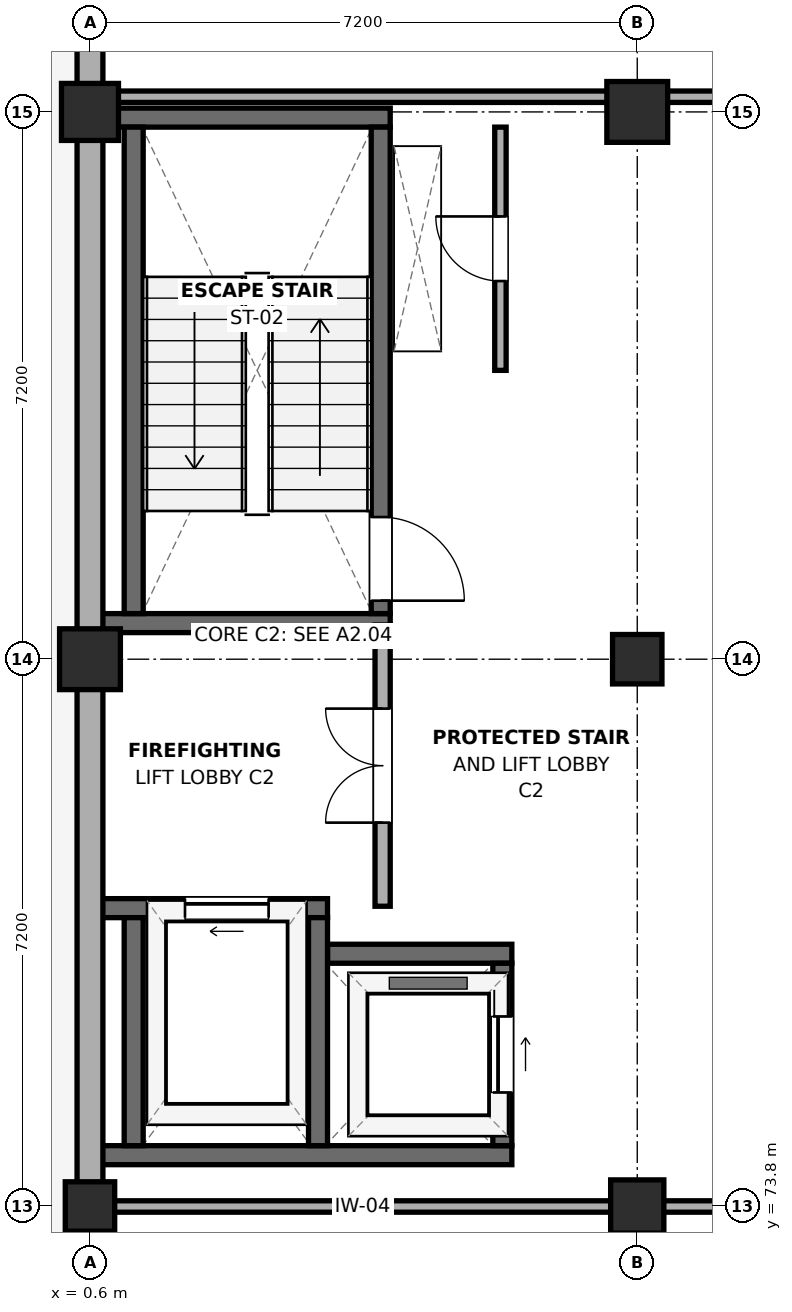
"""IFC4 building model, lengths in metres.
Left out: names, types, materials, properties, quantities, classifications, styles, units other than length and angle.
Written with IfcOpenShell. Run it as: python <this file> out.ifc"""

import sys

from ifc_helpers import new_model, si_unit, direction, frame, frame_2d, origin, origin_2d, place, context, subcontext, project, spatial, rectangle, extrude, element, fill, save


model = new_model("IFC4")
c1 = context("Model", 3, precision=1e-05, world=origin(), true_north=direction((0.0, 1.0)))
c2 = subcontext(c1, "Body", "Model", "MODEL_VIEW")
j1 = project(units=[si_unit("LENGTHUNIT", "METRE"), si_unit("PLANEANGLEUNIT", "RADIAN")], contexts=[c1])
p1 = place(None, origin())
s1 = spatial("IfcSite", under=j1, at=p1, CompositionType="ELEMENT")
p2 = place(p1, origin())
s2 = spatial("IfcBuilding", under=s1, at=p2, CompositionType="ELEMENT")
p3 = place(p2, frame((0.0, 0.0, 4.8)))
s3 = spatial("IfcBuildingStorey", under=s2, at=p3, CompositionType="ELEMENT", Elevation=4.8)
p4 = place(p3, frame((0.6, 73.8, 0.0), z_axis=(0.0, 0.0, 1.0), x_axis=(1.0, 0.0, 0.0)))
e1 = element("IfcColumn", 1, at=p4, inside=s3, PredefinedType="COLUMN", context=c2, shape_type="SweptSolid", body=[
    extrude(rectangle(XDim=0.65, YDim=0.65, at=origin_2d()), origin(), (0.0, 0.0, 1.0), 4.2),
])
p5 = place(p3, frame((0.6, 81.0, 0.0), z_axis=(0.0, 0.0, 1.0), x_axis=(1.0, 0.0, 0.0)))
e2 = element("IfcColumn", 2, at=p5, inside=s3, PredefinedType="COLUMN", context=c2, shape_type="SweptSolid", body=[
    extrude(rectangle(XDim=0.8, YDim=0.8, at=origin_2d()), origin(), (0.0, 0.0, 1.0), 4.2),
])
p6 = place(p3, frame((0.6, 88.2, 0.0), z_axis=(0.0, 0.0, 1.0), x_axis=(1.0, 0.0, 0.0)))
e3 = element("IfcColumn", 3, at=p6, inside=s3, PredefinedType="COLUMN", context=c2, shape_type="SweptSolid", body=[
    extrude(rectangle(XDim=0.75, YDim=0.75, at=origin_2d()), origin(), (0.0, 0.0, 1.0), 4.2),
])
p7 = place(p3, frame((7.8, 73.8, 0.0), z_axis=(0.0, 0.0, 1.0), x_axis=(1.0, 0.0, 0.0)))
e4 = element("IfcColumn", 4, at=p7, inside=s3, PredefinedType="COLUMN", context=c2, shape_type="SweptSolid", body=[
    extrude(rectangle(XDim=0.7, YDim=0.7, at=origin_2d()), origin(), (0.0, 0.0, 1.0), 4.2),
])
p8 = place(p3, frame((7.8, 81.0, 0.0), z_axis=(0.0, 0.0, 1.0), x_axis=(1.0, 0.0, 0.0)))
e5 = element("IfcColumn", 5, at=p8, inside=s3, PredefinedType="COLUMN", context=c2, shape_type="SweptSolid", body=[
    extrude(rectangle(XDim=0.65, YDim=0.65, at=origin_2d()), origin(), (0.0, 0.0, 1.0), 4.2),
])
p9 = place(p3, frame((7.8, 88.2, 0.0), z_axis=(0.0, 0.0, 1.0), x_axis=(1.0, 0.0, 0.0)))
e6 = element("IfcColumn", 6, at=p9, inside=s3, PredefinedType="COLUMN", context=c2, shape_type="SweptSolid", body=[
    extrude(rectangle(XDim=0.8, YDim=0.8, at=origin_2d()), origin(), (0.0, 0.0, 1.0), 4.2),
])
for number, where, z_axis, x_axis in (
    (7, (0.75, 81.475, 0.0), (0.0, 0.0, 1.0), (1.0, 0.0, 0.0)),
    (8, (0.75, 88.125, 0.0), (0.0, 0.0, 1.0), (1.0, 0.0, 0.0)),
):
    element("IfcWall", number, at=place(p3, frame(where, z_axis=z_axis, x_axis=x_axis)), inside=s3, PredefinedType="SHEAR", context=c2, shape_type="SweptSolid", body=[
        extrude(rectangle(XDim=3.8, YDim=0.25, at=frame_2d((1.9, 0.0))), origin(), (0.0, 0.0, 1.0), 3.98),
    ])
p10 = place(p3, frame((1.175, 81.6, 0.0), z_axis=(0.0, 0.0, 1.0), x_axis=(0.0, 1.0, 0.0)))
e9 = element("IfcWall", 9, at=p10, inside=s3, PredefinedType="SHEAR", context=c2, shape_type="SweptSolid", body=[
    extrude(rectangle(XDim=6.4, YDim=0.25, at=frame_2d((3.2, 0.0))), origin(), (0.0, 0.0, 1.0), 3.98),
])
p11 = place(p3, frame((4.425, 81.6, 0.0), z_axis=(0.0, 0.0, 1.0), x_axis=(0.0, 1.0, 0.0)))
e10 = element("IfcWall", 10, at=p11, inside=s3, PredefinedType="SHEAR", context=c2, shape_type="SweptSolid", body=[
    extrude(rectangle(XDim=6.4, YDim=0.25, at=frame_2d((3.2, 0.0))), origin(), (0.0, 0.0, 1.0), 3.98),
])
p12 = place(p11, frame((0.17, 0.0, 0.0)))
e11 = element("IfcOpeningElement", 11, at=p12, cuts=e10, PredefinedType="OPENING", context=c2, shape_type="SweptSolid", body=[
    extrude(rectangle(XDim=1.1, YDim=2.15, at=frame_2d((0.55, 1.075))), frame((0.0, 0.14, 0.0), z_axis=(0.0, -1.0, 0.0), x_axis=(1.0, 0.0, 0.0)), (0.0, 0.0, 1.0), 0.28),
])
p13 = place(p3, frame((0.75, 74.475, 0.0), z_axis=(0.0, 0.0, 1.0), x_axis=(1.0, 0.0, 0.0)))
e12 = element("IfcWall", 12, at=p13, inside=s3, PredefinedType="SHEAR", context=c2, shape_type="SweptSolid", body=[
    extrude(rectangle(XDim=5.4, YDim=0.25, at=frame_2d((2.7, 0.0))), origin(), (0.0, 0.0, 1.0), 3.98),
])
p14 = place(p3, frame((0.75, 77.725, 0.0), z_axis=(0.0, 0.0, 1.0), x_axis=(1.0, 0.0, 0.0)))
e13 = element("IfcWall", 13, at=p14, inside=s3, PredefinedType="SHEAR", context=c2, shape_type="SweptSolid", body=[
    extrude(rectangle(XDim=2.975, YDim=0.25, at=frame_2d((1.488, 0.0))), origin(), (0.0, 0.0, 1.0), 3.98),
])
p15 = place(p14, frame((1.1, 0.0, 0.0)))
e14 = element("IfcOpeningElement", 14, at=p15, cuts=e13, PredefinedType="OPENING", context=c2, shape_type="SweptSolid", body=[
    extrude(rectangle(XDim=1.1, YDim=2.15, at=frame_2d((0.55, 1.075))), frame((0.0, 0.14, 0.0), z_axis=(0.0, -1.0, 0.0), x_axis=(1.0, 0.0, 0.0)), (0.0, 0.0, 1.0), 0.28),
])
p16 = place(p3, frame((3.725, 77.125, 0.0), z_axis=(0.0, 0.0, 1.0), x_axis=(1.0, 0.0, 0.0)))
e15 = element("IfcWall", 15, at=p16, inside=s3, PredefinedType="SHEAR", context=c2, shape_type="SweptSolid", body=[
    extrude(rectangle(XDim=2.425, YDim=0.25, at=frame_2d((1.212, 0.0))), origin(), (0.0, 0.0, 1.0), 3.98),
])
for number, where, z_axis, x_axis in (
    (16, (1.175, 74.6, 0.0), (0.0, 0.0, 1.0), (0.0, 1.0, 0.0)),
    (17, (3.6, 74.6, 0.0), (0.0, 0.0, 1.0), (0.0, 1.0, 0.0)),
):
    element("IfcWall", number, at=place(p3, frame(where, z_axis=z_axis, x_axis=x_axis)), inside=s3, PredefinedType="SHEAR", context=c2, shape_type="SweptSolid", body=[
        extrude(rectangle(XDim=3.0, YDim=0.25, at=frame_2d((1.5, 0.0))), origin(), (0.0, 0.0, 1.0), 3.98),
    ])
p17 = place(p3, frame((6.025, 74.6, 0.0), z_axis=(0.0, 0.0, 1.0), x_axis=(0.0, 1.0, 0.0)))
e18 = element("IfcWall", 18, at=p17, inside=s3, PredefinedType="SHEAR", context=c2, shape_type="SweptSolid", body=[
    extrude(rectangle(XDim=2.4, YDim=0.25, at=frame_2d((1.2, 0.0))), origin(), (0.0, 0.0, 1.0), 3.98),
])
p18 = place(p17, frame((0.7, 0.0, 0.0)))
e19 = element("IfcOpeningElement", 19, at=p18, cuts=e18, PredefinedType="OPENING", context=c2, shape_type="SweptSolid", body=[
    extrude(rectangle(XDim=1.0, YDim=2.15, at=frame_2d((0.5, 1.075))), frame((0.0, 0.14, 0.0), z_axis=(0.0, -1.0, 0.0), x_axis=(1.0, 0.0, 0.0)), (0.0, 0.0, 1.0), 0.28),
])
p19 = place(p3, frame((0.6, 66.6, 0.0), z_axis=(0.0, 0.0, 1.0), x_axis=(0.0, 1.0, 0.0)))
e20 = element("IfcWall", 20, at=p19, inside=s3, PredefinedType="SOLIDWALL", context=c2, shape_type="SweptSolid", body=[
    extrude(rectangle(XDim=7.2, YDim=0.34, at=frame_2d((3.6, 0.0))), origin(), (0.0, 0.0, 1.0), 3.475),
])
p20 = place(p19, frame((2.6, 0.0, 0.9)))
e21 = element("IfcOpeningElement", 21, at=p20, cuts=e20, PredefinedType="OPENING", context=c2, shape_type="SweptSolid", body=[
    extrude(rectangle(XDim=2.0, YDim=1.8, at=frame_2d((1.0, 0.9))), frame((0.0, 0.185, 0.0), z_axis=(0.0, -1.0, 0.0), x_axis=(1.0, 0.0, 0.0)), (0.0, 0.0, 1.0), 0.37),
])
p21 = place(p3, frame((0.6, 73.8, 0.0), z_axis=(0.0, 0.0, 1.0), x_axis=(0.0, 1.0, 0.0)))
e22 = element("IfcWall", 22, at=p21, inside=s3, PredefinedType="SOLIDWALL", context=c2, shape_type="SweptSolid", body=[
    extrude(rectangle(XDim=7.2, YDim=0.34, at=frame_2d((3.6, 0.0))), origin(), (0.0, 0.0, 1.0), 3.525),
])
p22 = place(p3, frame((0.6, 81.0, 0.0), z_axis=(0.0, 0.0, 1.0), x_axis=(0.0, 1.0, 0.0)))
e23 = element("IfcWall", 23, at=p22, inside=s3, PredefinedType="SOLIDWALL", context=c2, shape_type="SweptSolid", body=[
    extrude(rectangle(XDim=7.2, YDim=0.34, at=frame_2d((3.6, 0.0))), origin(), (0.0, 0.0, 1.0), 3.625),
])
p23 = place(p3, frame((0.6, 88.2, 0.0), z_axis=(0.0, 0.0, 1.0), x_axis=(0.0, 1.0, 0.0)))
e24 = element("IfcWall", 24, at=p23, inside=s3, PredefinedType="SOLIDWALL", context=c2, shape_type="SweptSolid", body=[
    extrude(rectangle(XDim=7.8, YDim=0.34, at=frame_2d((3.9, 0.0))), origin(), (0.0, 0.0, 1.0), 3.645),
])
p24 = place(p3, frame((4.45, 77.75, 0.0), z_axis=(0.0, 0.0, 1.0), x_axis=(0.0, 1.0, 0.0)))
e25 = element("IfcWall", 25, at=p24, inside=s3, PredefinedType="PARTITIONING", context=c2, shape_type="SweptSolid", body=[
    extrude(rectangle(XDim=3.7, YDim=0.2, at=frame_2d((1.85, 0.0))), origin(), (0.0, 0.0, 1.0), 3.475),
])
p25 = place(p24, frame((1.1, 0.0, 0.0)))
e26 = element("IfcOpeningElement", 26, at=p25, cuts=e25, PredefinedType="OPENING", context=c2, shape_type="SweptSolid", body=[
    extrude(rectangle(XDim=1.5, YDim=2.15, at=frame_2d((0.75, 1.075))), frame((0.0, 0.115, 0.0), z_axis=(0.0, -1.0, 0.0), x_axis=(1.0, 0.0, 0.0)), (0.0, 0.0, 1.0), 0.23),
])
p26 = place(p3, frame((6.0, 84.8, 0.0), z_axis=(0.0, 0.0, 1.0), x_axis=(0.0, 1.0, 0.0)))
e27 = element("IfcWall", 27, at=p26, inside=s3, PredefinedType="PARTITIONING", context=c2, shape_type="SweptSolid", body=[
    extrude(rectangle(XDim=3.2, YDim=0.15, at=frame_2d((1.6, 0.0))), origin(), (0.0, 0.0, 1.0), 3.645),
])
p27 = place(p26, frame((1.175, 0.0, 0.0)))
e28 = element("IfcOpeningElement", 28, at=p27, cuts=e27, PredefinedType="OPENING", context=c2, shape_type="SweptSolid", body=[
    extrude(rectangle(XDim=0.85, YDim=2.1, at=frame_2d((0.425, 1.05))), frame((0.0, 0.09, 0.0), z_axis=(0.0, -1.0, 0.0), x_axis=(1.0, 0.0, 0.0)), (0.0, 0.0, 1.0), 0.18),
])
for number, where, z_axis, x_axis in (
    (29, (0.78, 73.8, 0.0), (0.0, 0.0, 1.0), (1.0, 0.0, 0.0)),
    (30, (0.78, 88.4, 0.0), (0.0, 0.0, 1.0), (1.0, 0.0, 0.0)),
):
    element("IfcWall", number, at=place(p3, frame(where, z_axis=z_axis, x_axis=x_axis)), inside=s3, PredefinedType="PARTITIONING", context=c2, shape_type="SweptSolid", body=[
        extrude(rectangle(XDim=11.82, YDim=0.15, at=frame_2d((5.91, 0.0))), origin(), (0.0, 0.0, 1.0), 3.375),
    ])
p28 = place(p12, frame((1.1, 0.0, 0.0), z_axis=(0.0, 0.0, 1.0), x_axis=(-1.0, 0.0, 0.0)))
e31 = element("IfcDoor", 31, at=p28, inside=s3, OperationType="SINGLE_SWING_RIGHT", PredefinedType="DOOR", context=c2, shape_type="SweptSolid", body=[
    extrude(rectangle(XDim=1.1, YDim=2.15, at=frame_2d((0.55, 1.075))), frame((0.0, 0.025, 0.0), z_axis=(0.0, -1.0, 0.0), x_axis=(1.0, 0.0, 0.0)), (0.0, 0.0, 1.0), 0.05),
])
fill(e11, e31)
p29 = place(p15, origin())
e32 = element("IfcDoor", 32, at=p29, inside=s3, OperationType="SLIDING_TO_LEFT", PredefinedType="DOOR", context=c2, shape_type="SweptSolid", body=[
    extrude(rectangle(XDim=1.1, YDim=2.15, at=frame_2d((0.55, 1.075))), frame((0.0, 0.025, 0.0), z_axis=(0.0, -1.0, 0.0), x_axis=(1.0, 0.0, 0.0)), (0.0, 0.0, 1.0), 0.05),
])
fill(e14, e32)
p30 = place(p18, frame((1.0, 0.0, 0.0), z_axis=(0.0, 0.0, 1.0), x_axis=(-1.0, 0.0, 0.0)))
e33 = element("IfcDoor", 33, at=p30, inside=s3, OperationType="SLIDING_TO_RIGHT", PredefinedType="DOOR", context=c2, shape_type="SweptSolid", body=[
    extrude(rectangle(XDim=1.0, YDim=2.15, at=frame_2d((0.5, 1.075))), frame((0.0, 0.025, 0.0), z_axis=(0.0, -1.0, 0.0), x_axis=(1.0, 0.0, 0.0)), (0.0, 0.0, 1.0), 0.05),
])
fill(e19, e33)
p31 = place(p25, origin())
e34 = element("IfcDoor", 34, at=p31, inside=s3, OperationType="DOUBLE_DOOR_SINGLE_SWING", PredefinedType="DOOR", context=c2, shape_type="SweptSolid", body=[
    extrude(rectangle(XDim=1.5, YDim=2.15, at=frame_2d((0.75, 1.075))), frame((0.0, 0.025, 0.0), z_axis=(0.0, -1.0, 0.0), x_axis=(1.0, 0.0, 0.0)), (0.0, 0.0, 1.0), 0.05),
])
fill(e26, e34)
p32 = place(p27, origin())
e35 = element("IfcDoor", 35, at=p32, inside=s3, OperationType="SINGLE_SWING_RIGHT", PredefinedType="DOOR", context=c2, shape_type="SweptSolid", body=[
    extrude(rectangle(XDim=0.85, YDim=2.1, at=frame_2d((0.425, 1.05))), frame((0.0, 0.025, 0.0), z_axis=(0.0, -1.0, 0.0), x_axis=(1.0, 0.0, 0.0)), (0.0, 0.0, 1.0), 0.05),
])
fill(e28, e35)
save(model, sys.argv[1])
